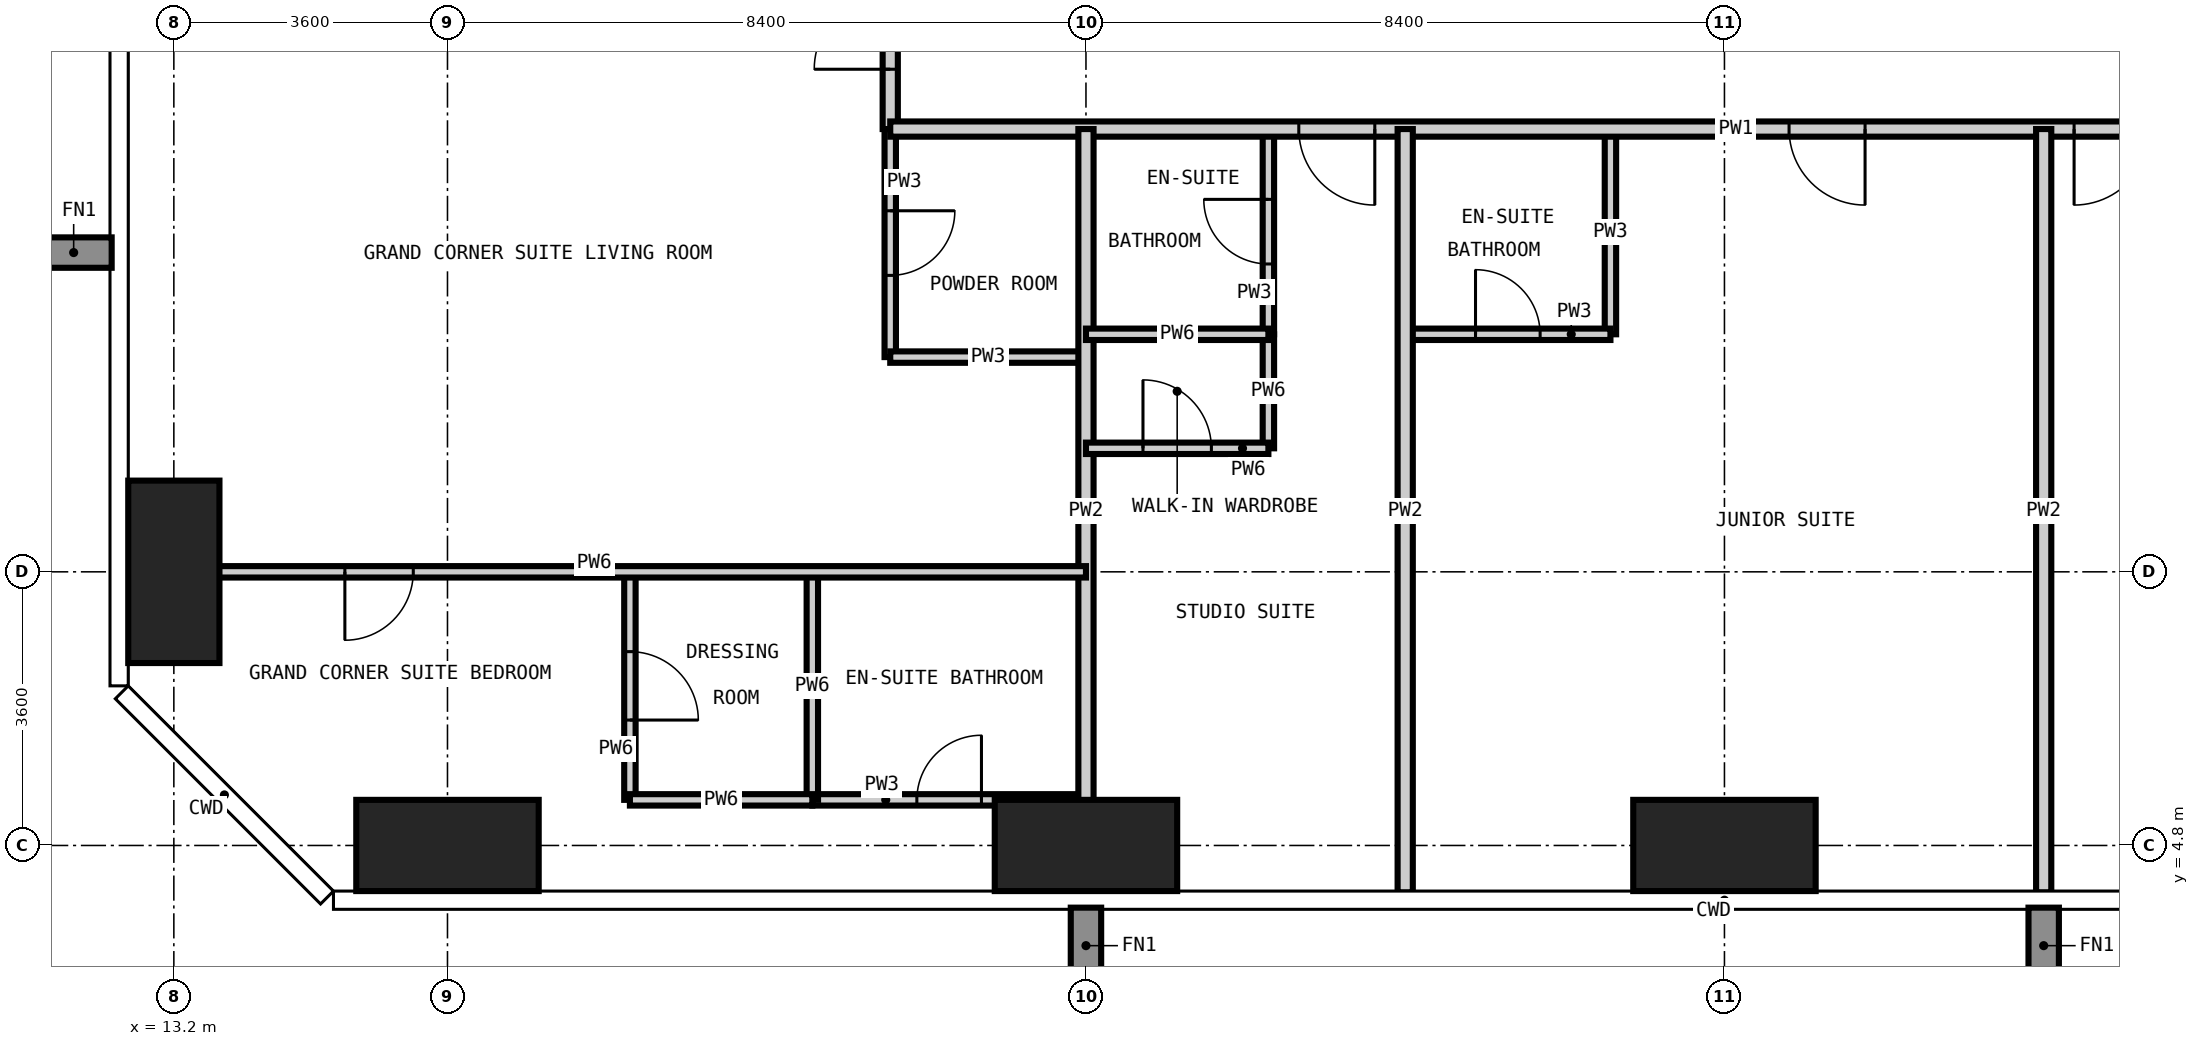
"""IFC4 building model, lengths in metres.
Left out: names, types, materials, properties, quantities, classifications, styles, units other than length and angle.
Written with IfcOpenShell. Run it as: python <this file> out.ifc"""

import sys

from ifc_helpers import new_model, si_unit, direction, frame, frame_2d, origin, origin_2d, place, context, subcontext, project, spatial, rectangle, extrude, element, fill, save


model = new_model("IFC4")
c1 = context("Model", 3, precision=1e-05, world=origin(), true_north=direction((0.0, 1.0)))
c2 = subcontext(c1, "Body", "Model", "MODEL_VIEW")
j1 = project(units=[si_unit("LENGTHUNIT", "METRE"), si_unit("PLANEANGLEUNIT", "RADIAN")], contexts=[c1])
p1 = place(None, origin())
s1 = spatial("IfcSite", under=j1, at=p1, CompositionType="ELEMENT")
p2 = place(p1, origin())
s2 = spatial("IfcBuilding", under=s1, at=p2, CompositionType="ELEMENT")
p3 = place(p2, frame((0.0, 0.0, 233.4)))
s3 = spatial("IfcBuildingStorey", under=s2, at=p3, CompositionType="ELEMENT", Elevation=233.4)
p4 = place(p3, frame((13.2, 8.4, -0.35), z_axis=(0.0, 0.0, 1.0), x_axis=(1.0, 0.0, 0.0)))
e1 = element("IfcColumn", 1, at=p4, inside=s3, PredefinedType="COLUMN", context=c2, shape_type="SweptSolid", body=[
    extrude(rectangle(XDim=1.2, YDim=2.4, at=origin_2d()), origin(), (0.0, 0.0, 1.0), 3.9),
])
for number, where, z_axis, x_axis in (
    (2, (16.8, 4.8, -0.35), (0.0, 0.0, 1.0), (1.0, 0.0, 0.0)),
    (3, (25.2, 4.8, -0.35), (0.0, 0.0, 1.0), (1.0, 0.0, 0.0)),
    (4, (33.6, 4.8, -0.35), (0.0, 0.0, 1.0), (1.0, 0.0, 0.0)),
):
    element("IfcColumn", number, at=place(p3, frame(where, z_axis=z_axis, x_axis=x_axis)), inside=s3, PredefinedType="COLUMN", context=c2, shape_type="SweptSolid", body=[
        extrude(rectangle(XDim=2.4, YDim=1.2, at=origin_2d()), origin(), (0.0, 0.0, 1.0), 3.9),
    ])
p5 = place(p3, frame((22.625, 11.225, 0.0), z_axis=(0.0, 0.0, 1.0), x_axis=(0.0, 1.0, 0.0)))
e5 = element("IfcWall", 5, at=p5, inside=s3, PredefinedType="PARTITIONING", context=c2, shape_type="SweptSolid", body=[
    extrude(rectangle(XDim=3.0, YDim=0.15, at=frame_2d((1.5, 0.0))), origin(), (0.0, 0.0, 1.0), 3.55),
])
p6 = place(p5, frame((1.075, 0.0, 0.0)))
e6 = element("IfcOpeningElement", 6, at=p6, cuts=e5, PredefinedType="OPENING", context=c2, shape_type="SweptSolid", body=[
    extrude(rectangle(XDim=0.85, YDim=2.1, at=frame_2d((0.425, 1.05))), frame((0.0, 0.085, 0.0), z_axis=(0.0, -1.0, 0.0), x_axis=(1.0, 0.0, 0.0)), (0.0, 0.0, 1.0), 0.17),
])
p7 = place(p3, frame((27.6, 11.525, 0.0), z_axis=(0.0, 0.0, 1.0), x_axis=(0.0, 1.0, 0.0)))
e7 = element("IfcWall", 7, at=p7, inside=s3, PredefinedType="PARTITIONING", context=c2, shape_type="SweptSolid", body=[
    extrude(rectangle(XDim=2.7, YDim=0.15, at=frame_2d((1.35, 0.0))), origin(), (0.0, 0.0, 1.0), 3.55),
])
p8 = place(p7, frame((0.925, 0.0, 0.0)))
e8 = element("IfcOpeningElement", 8, at=p8, cuts=e7, PredefinedType="OPENING", context=c2, shape_type="SweptSolid", body=[
    extrude(rectangle(XDim=0.85, YDim=2.1, at=frame_2d((0.425, 1.05))), frame((0.0, 0.085, 0.0), z_axis=(0.0, -1.0, 0.0), x_axis=(1.0, 0.0, 0.0)), (0.0, 0.0, 1.0), 0.17),
])
p9 = place(p3, frame((32.1, 11.525, 0.0), z_axis=(0.0, 0.0, 1.0), x_axis=(0.0, 1.0, 0.0)))
e9 = element("IfcWall", 9, at=p9, inside=s3, PredefinedType="PARTITIONING", context=c2, shape_type="SweptSolid", body=[
    extrude(rectangle(XDim=2.7, YDim=0.15, at=frame_2d((1.35, 0.0))), origin(), (0.0, 0.0, 1.0), 3.55),
])
p10 = place(p3, frame((21.6, 5.4, 0.0), z_axis=(0.0, 0.0, 1.0), x_axis=(1.0, 0.0, 0.0)))
e10 = element("IfcWall", 10, at=p10, inside=s3, PredefinedType="PARTITIONING", context=c2, shape_type="SweptSolid", body=[
    extrude(rectangle(XDim=3.6, YDim=0.15, at=frame_2d((1.8, 0.0))), origin(), (0.0, 0.0, 1.0), 3.55),
])
p11 = place(p10, frame((1.375, 0.0, 0.0)))
e11 = element("IfcOpeningElement", 11, at=p11, cuts=e10, PredefinedType="OPENING", context=c2, shape_type="SweptSolid", body=[
    extrude(rectangle(XDim=0.85, YDim=2.1, at=frame_2d((0.425, 1.05))), frame((0.0, 0.085, 0.0), z_axis=(0.0, -1.0, 0.0), x_axis=(1.0, 0.0, 0.0)), (0.0, 0.0, 1.0), 0.17),
])
p12 = place(p3, frame((22.625, 11.225, 0.0), z_axis=(0.0, 0.0, 1.0), x_axis=(1.0, 0.0, 0.0)))
e12 = element("IfcWall", 12, at=p12, inside=s3, PredefinedType="PARTITIONING", context=c2, shape_type="SweptSolid", body=[
    extrude(rectangle(XDim=2.575, YDim=0.15, at=frame_2d((1.288, 0.0))), origin(), (0.0, 0.0, 1.0), 3.55),
])
p13 = place(p3, frame((29.4, 11.525, 0.0), z_axis=(0.0, 0.0, 1.0), x_axis=(1.0, 0.0, 0.0)))
e13 = element("IfcWall", 13, at=p13, inside=s3, PredefinedType="PARTITIONING", context=c2, shape_type="SweptSolid", body=[
    extrude(rectangle(XDim=2.7, YDim=0.15, at=frame_2d((1.35, 0.0))), origin(), (0.0, 0.0, 1.0), 3.55),
])
p14 = place(p13, frame((0.925, 0.0, 0.0)))
e14 = element("IfcOpeningElement", 14, at=p14, cuts=e13, PredefinedType="OPENING", context=c2, shape_type="SweptSolid", body=[
    extrude(rectangle(XDim=0.85, YDim=2.1, at=frame_2d((0.425, 1.05))), frame((0.0, 0.085, 0.0), z_axis=(0.0, -1.0, 0.0), x_axis=(1.0, 0.0, 0.0)), (0.0, 0.0, 1.0), 0.17),
])
p15 = place(p3, frame((22.625, 14.225, 0.0), z_axis=(0.0, 0.0, 1.0), x_axis=(0.0, 1.0, 0.0)))
e15 = element("IfcWall", 15, at=p15, inside=s3, PredefinedType="PARTITIONING", context=c2, shape_type="SweptSolid", body=[
    extrude(rectangle(XDim=30.95, YDim=0.2, at=frame_2d((15.475, 0.0))), origin(), (0.0, 0.0, 1.0), 3.55),
])
p16 = place(p15, frame((5.075, 0.0, 0.0)))
e16 = element("IfcOpeningElement", 16, at=p16, cuts=e15, PredefinedType="OPENING", context=c2, shape_type="SweptSolid", body=[
    extrude(rectangle(XDim=1.0, YDim=2.2, at=frame_2d((0.5, 1.1))), frame((0.0, 0.11, 0.0), z_axis=(0.0, -1.0, 0.0), x_axis=(1.0, 0.0, 0.0)), (0.0, 0.0, 1.0), 0.22),
])
p17 = place(p15, frame((13.475, 0.0, 0.0)))
e17 = element("IfcOpeningElement", 17, at=p17, cuts=e15, PredefinedType="OPENING", context=c2, shape_type="SweptSolid", body=[
    extrude(rectangle(XDim=1.0, YDim=2.2, at=frame_2d((0.5, 1.1))), frame((0.0, 0.11, 0.0), z_axis=(0.0, -1.0, 0.0), x_axis=(1.0, 0.0, 0.0)), (0.0, 0.0, 1.0), 0.22),
])
p18 = place(p15, frame((21.875, 0.0, 0.0)))
e18 = element("IfcOpeningElement", 18, at=p18, cuts=e15, PredefinedType="OPENING", context=c2, shape_type="SweptSolid", body=[
    extrude(rectangle(XDim=1.0, YDim=2.2, at=frame_2d((0.5, 1.1))), frame((0.0, 0.11, 0.0), z_axis=(0.0, -1.0, 0.0), x_axis=(1.0, 0.0, 0.0)), (0.0, 0.0, 1.0), 0.22),
])
p19 = place(p15, frame((0.787, 0.0, 0.0)))
e19 = element("IfcOpeningElement", 19, at=p19, cuts=e15, PredefinedType="OPENING", context=c2, shape_type="SweptSolid", body=[
    extrude(rectangle(XDim=1.0, YDim=2.2, at=frame_2d((0.5, 1.1))), frame((0.0, 0.11, 0.0), z_axis=(0.0, -1.0, 0.0), x_axis=(1.0, 0.0, 0.0)), (0.0, 0.0, 1.0), 0.22),
])
p20 = place(p15, frame((28.862, 0.0, 0.0)))
e20 = element("IfcOpeningElement", 20, at=p20, cuts=e15, PredefinedType="OPENING", context=c2, shape_type="SweptSolid", body=[
    extrude(rectangle(XDim=1.0, YDim=2.2, at=frame_2d((0.5, 1.1))), frame((0.0, 0.11, 0.0), z_axis=(0.0, -1.0, 0.0), x_axis=(1.0, 0.0, 0.0)), (0.0, 0.0, 1.0), 0.22),
])
p21 = place(p3, frame((44.875, 14.225, 0.0), z_axis=(0.0, 0.0, 1.0), x_axis=(-1.0, 0.0, 0.0)))
e21 = element("IfcWall", 21, at=p21, inside=s3, PredefinedType="PARTITIONING", context=c2, shape_type="SweptSolid", body=[
    extrude(rectangle(XDim=22.25, YDim=0.2, at=frame_2d((11.125, 0.0))), origin(), (0.0, 0.0, 1.0), 3.55),
])
p22 = place(p21, frame((15.875, 0.0, 0.0)))
e22 = element("IfcOpeningElement", 22, at=p22, cuts=e21, PredefinedType="OPENING", context=c2, shape_type="SweptSolid", body=[
    extrude(rectangle(XDim=1.0, YDim=2.2, at=frame_2d((0.5, 1.1))), frame((0.0, 0.11, 0.0), z_axis=(0.0, -1.0, 0.0), x_axis=(1.0, 0.0, 0.0)), (0.0, 0.0, 1.0), 0.22),
])
p23 = place(p21, frame((9.425, 0.0, 0.0)))
e23 = element("IfcOpeningElement", 23, at=p23, cuts=e21, PredefinedType="OPENING", context=c2, shape_type="SweptSolid", body=[
    extrude(rectangle(XDim=1.0, YDim=2.2, at=frame_2d((0.5, 1.1))), frame((0.0, 0.11, 0.0), z_axis=(0.0, -1.0, 0.0), x_axis=(1.0, 0.0, 0.0)), (0.0, 0.0, 1.0), 0.22),
])
p24 = place(p21, frame((5.675, 0.0, 0.0)))
e24 = element("IfcOpeningElement", 24, at=p24, cuts=e21, PredefinedType="OPENING", context=c2, shape_type="SweptSolid", body=[
    extrude(rectangle(XDim=1.0, YDim=2.2, at=frame_2d((0.5, 1.1))), frame((0.0, 0.11, 0.0), z_axis=(0.0, -1.0, 0.0), x_axis=(1.0, 0.0, 0.0)), (0.0, 0.0, 1.0), 0.22),
])
for number, where, z_axis, x_axis in (
    (25, (25.2, 4.182, 0.0), (0.0, 0.0, 1.0), (0.0, 1.0, 0.0)),
    (26, (29.4, 4.182, 0.0), (0.0, 0.0, 1.0), (0.0, 1.0, 0.0)),
    (27, (37.8, 4.182, 0.0), (0.0, 0.0, 1.0), (0.0, 1.0, 0.0)),
):
    element("IfcWall", number, at=place(p3, frame(where, z_axis=z_axis, x_axis=x_axis)), inside=s3, PredefinedType="PARTITIONING", context=c2, shape_type="SweptSolid", body=[
        extrude(rectangle(XDim=10.043, YDim=0.2, at=frame_2d((5.021, 0.0))), origin(), (0.0, 0.0, 1.0), 3.55),
    ])
p25 = place(p3, frame((19.2, 5.4, 0.0), z_axis=(0.0, 0.0, 1.0), x_axis=(0.0, 1.0, 0.0)))
e28 = element("IfcWall", 28, at=p25, inside=s3, PredefinedType="PARTITIONING", context=c2, shape_type="SweptSolid", body=[
    extrude(rectangle(XDim=3.0, YDim=0.15, at=frame_2d((1.5, 0.0))), origin(), (0.0, 0.0, 1.0), 3.55),
])
p26 = place(p25, frame((1.05, 0.0, 0.0)))
e29 = element("IfcOpeningElement", 29, at=p26, cuts=e28, PredefinedType="OPENING", context=c2, shape_type="SweptSolid", body=[
    extrude(rectangle(XDim=0.9, YDim=2.1, at=frame_2d((0.45, 1.05))), frame((0.0, 0.085, 0.0), z_axis=(0.0, -1.0, 0.0), x_axis=(1.0, 0.0, 0.0)), (0.0, 0.0, 1.0), 0.17),
])
p27 = place(p3, frame((21.6, 5.4, 0.0), z_axis=(0.0, 0.0, 1.0), x_axis=(0.0, 1.0, 0.0)))
e30 = element("IfcWall", 30, at=p27, inside=s3, PredefinedType="PARTITIONING", context=c2, shape_type="SweptSolid", body=[
    extrude(rectangle(XDim=3.0, YDim=0.15, at=frame_2d((1.5, 0.0))), origin(), (0.0, 0.0, 1.0), 3.55),
])
p28 = place(p3, frame((27.6, 10.025, 0.0), z_axis=(0.0, 0.0, 1.0), x_axis=(0.0, 1.0, 0.0)))
e31 = element("IfcWall", 31, at=p28, inside=s3, PredefinedType="PARTITIONING", context=c2, shape_type="SweptSolid", body=[
    extrude(rectangle(XDim=1.5, YDim=0.15, at=frame_2d((0.75, 0.0))), origin(), (0.0, 0.0, 1.0), 3.55),
])
p29 = place(p3, frame((19.2, 5.4, 0.0), z_axis=(0.0, 0.0, 1.0), x_axis=(1.0, 0.0, 0.0)))
e32 = element("IfcWall", 32, at=p29, inside=s3, PredefinedType="PARTITIONING", context=c2, shape_type="SweptSolid", body=[
    extrude(rectangle(XDim=2.4, YDim=0.15, at=frame_2d((1.2, 0.0))), origin(), (0.0, 0.0, 1.0), 3.55),
])
p30 = place(p3, frame((12.582, 8.4, 0.0), z_axis=(0.0, 0.0, 1.0), x_axis=(1.0, 0.0, 0.0)))
e33 = element("IfcWall", 33, at=p30, inside=s3, PredefinedType="PARTITIONING", context=c2, shape_type="SweptSolid", body=[
    extrude(rectangle(XDim=12.618, YDim=0.15, at=frame_2d((6.309, 0.0))), origin(), (0.0, 0.0, 1.0), 3.55),
])
p31 = place(p30, frame((2.868, 0.0, 0.0)))
e34 = element("IfcOpeningElement", 34, at=p31, cuts=e33, PredefinedType="OPENING", context=c2, shape_type="SweptSolid", body=[
    extrude(rectangle(XDim=0.9, YDim=2.1, at=frame_2d((0.45, 1.05))), frame((0.0, 0.085, 0.0), z_axis=(0.0, -1.0, 0.0), x_axis=(1.0, 0.0, 0.0)), (0.0, 0.0, 1.0), 0.17),
])
p32 = place(p3, frame((25.2, 10.025, 0.0), z_axis=(0.0, 0.0, 1.0), x_axis=(1.0, 0.0, 0.0)))
e35 = element("IfcWall", 35, at=p32, inside=s3, PredefinedType="PARTITIONING", context=c2, shape_type="SweptSolid", body=[
    extrude(rectangle(XDim=2.4, YDim=0.15, at=frame_2d((1.2, 0.0))), origin(), (0.0, 0.0, 1.0), 3.55),
])
p33 = place(p32, frame((0.75, 0.0, 0.0)))
e36 = element("IfcOpeningElement", 36, at=p33, cuts=e35, PredefinedType="OPENING", context=c2, shape_type="SweptSolid", body=[
    extrude(rectangle(XDim=0.9, YDim=2.1, at=frame_2d((0.45, 1.05))), frame((0.0, 0.085, 0.0), z_axis=(0.0, -1.0, 0.0), x_axis=(1.0, 0.0, 0.0)), (0.0, 0.0, 1.0), 0.17),
])
p34 = place(p3, frame((25.2, 11.525, 0.0), z_axis=(0.0, 0.0, 1.0), x_axis=(1.0, 0.0, 0.0)))
e37 = element("IfcWall", 37, at=p34, inside=s3, PredefinedType="PARTITIONING", context=c2, shape_type="SweptSolid", body=[
    extrude(rectangle(XDim=2.4, YDim=0.15, at=frame_2d((1.2, 0.0))), origin(), (0.0, 0.0, 1.0), 3.55),
])
p35 = place(p22, origin())
e38 = element("IfcDoor", 38, at=p35, inside=s3, OperationType="SINGLE_SWING_LEFT", PredefinedType="DOOR", context=c2, shape_type="SweptSolid", body=[
    extrude(rectangle(XDim=1.0, YDim=2.2, at=frame_2d((0.5, 1.1))), frame((0.0, 0.025, 0.0), z_axis=(0.0, -1.0, 0.0), x_axis=(1.0, 0.0, 0.0)), (0.0, 0.0, 1.0), 0.05),
])
fill(e22, e38)
p36 = place(p8, origin())
e39 = element("IfcDoor", 39, at=p36, inside=s3, OperationType="SINGLE_SWING_RIGHT", PredefinedType="DOOR", context=c2, shape_type="SweptSolid", body=[
    extrude(rectangle(XDim=0.85, YDim=2.1, at=frame_2d((0.425, 1.05))), frame((0.0, 0.025, 0.0), z_axis=(0.0, -1.0, 0.0), x_axis=(1.0, 0.0, 0.0)), (0.0, 0.0, 1.0), 0.05),
])
fill(e8, e39)
p37 = place(p33, origin())
e40 = element("IfcDoor", 40, at=p37, inside=s3, OperationType="SINGLE_SWING_LEFT", PredefinedType="DOOR", context=c2, shape_type="SweptSolid", body=[
    extrude(rectangle(XDim=0.9, YDim=2.1, at=frame_2d((0.45, 1.05))), frame((0.0, 0.025, 0.0), z_axis=(0.0, -1.0, 0.0), x_axis=(1.0, 0.0, 0.0)), (0.0, 0.0, 1.0), 0.05),
])
fill(e36, e40)
p38 = place(p23, origin())
e41 = element("IfcDoor", 41, at=p38, inside=s3, OperationType="SINGLE_SWING_LEFT", PredefinedType="DOOR", context=c2, shape_type="SweptSolid", body=[
    extrude(rectangle(XDim=1.0, YDim=2.2, at=frame_2d((0.5, 1.1))), frame((0.0, 0.025, 0.0), z_axis=(0.0, -1.0, 0.0), x_axis=(1.0, 0.0, 0.0)), (0.0, 0.0, 1.0), 0.05),
])
fill(e23, e41)
p39 = place(p14, origin())
e42 = element("IfcDoor", 42, at=p39, inside=s3, OperationType="SINGLE_SWING_LEFT", PredefinedType="DOOR", context=c2, shape_type="SweptSolid", body=[
    extrude(rectangle(XDim=0.85, YDim=2.1, at=frame_2d((0.425, 1.05))), frame((0.0, 0.025, 0.0), z_axis=(0.0, -1.0, 0.0), x_axis=(1.0, 0.0, 0.0)), (0.0, 0.0, 1.0), 0.05),
])
fill(e14, e42)
p40 = place(p24, origin())
e43 = element("IfcDoor", 43, at=p40, inside=s3, OperationType="SINGLE_SWING_RIGHT", PredefinedType="DOOR", context=c2, shape_type="SweptSolid", body=[
    extrude(rectangle(XDim=1.0, YDim=2.2, at=frame_2d((0.5, 1.1))), frame((0.0, 0.025, 0.0), z_axis=(0.0, -1.0, 0.0), x_axis=(1.0, 0.0, 0.0)), (0.0, 0.0, 1.0), 0.05),
])
fill(e24, e43)
p41 = place(p19, origin())
e44 = element("IfcDoor", 44, at=p41, inside=s3, OperationType="SINGLE_SWING_LEFT", PredefinedType="DOOR", context=c2, shape_type="SweptSolid", body=[
    extrude(rectangle(XDim=1.0, YDim=2.2, at=frame_2d((0.5, 1.1))), frame((0.0, 0.025, 0.0), z_axis=(0.0, -1.0, 0.0), x_axis=(1.0, 0.0, 0.0)), (0.0, 0.0, 1.0), 0.05),
])
fill(e19, e44)
p42 = place(p6, frame((0.85, 0.0, 0.0), z_axis=(0.0, 0.0, 1.0), x_axis=(-1.0, 0.0, 0.0)))
e45 = element("IfcDoor", 45, at=p42, inside=s3, OperationType="SINGLE_SWING_LEFT", PredefinedType="DOOR", context=c2, shape_type="SweptSolid", body=[
    extrude(rectangle(XDim=0.85, YDim=2.1, at=frame_2d((0.425, 1.05))), frame((0.0, 0.025, 0.0), z_axis=(0.0, -1.0, 0.0), x_axis=(1.0, 0.0, 0.0)), (0.0, 0.0, 1.0), 0.05),
])
fill(e6, e45)
p43 = place(p31, frame((0.9, 0.0, 0.0), z_axis=(0.0, 0.0, 1.0), x_axis=(-1.0, 0.0, 0.0)))
e46 = element("IfcDoor", 46, at=p43, inside=s3, OperationType="SINGLE_SWING_RIGHT", PredefinedType="DOOR", context=c2, shape_type="SweptSolid", body=[
    extrude(rectangle(XDim=0.9, YDim=2.1, at=frame_2d((0.45, 1.05))), frame((0.0, 0.025, 0.0), z_axis=(0.0, -1.0, 0.0), x_axis=(1.0, 0.0, 0.0)), (0.0, 0.0, 1.0), 0.05),
])
fill(e34, e46)
p44 = place(p11, origin())
e47 = element("IfcDoor", 47, at=p44, inside=s3, OperationType="SINGLE_SWING_RIGHT", PredefinedType="DOOR", context=c2, shape_type="SweptSolid", body=[
    extrude(rectangle(XDim=0.85, YDim=2.1, at=frame_2d((0.425, 1.05))), frame((0.0, 0.025, 0.0), z_axis=(0.0, -1.0, 0.0), x_axis=(1.0, 0.0, 0.0)), (0.0, 0.0, 1.0), 0.05),
])
fill(e11, e47)
p45 = place(p26, frame((0.9, 0.0, 0.0), z_axis=(0.0, 0.0, 1.0), x_axis=(-1.0, 0.0, 0.0)))
e48 = element("IfcDoor", 48, at=p45, inside=s3, OperationType="SINGLE_SWING_RIGHT", PredefinedType="DOOR", context=c2, shape_type="SweptSolid", body=[
    extrude(rectangle(XDim=0.9, YDim=2.1, at=frame_2d((0.45, 1.05))), frame((0.0, 0.025, 0.0), z_axis=(0.0, -1.0, 0.0), x_axis=(1.0, 0.0, 0.0)), (0.0, 0.0, 1.0), 0.05),
])
fill(e29, e48)
save(model, sys.argv[1])
